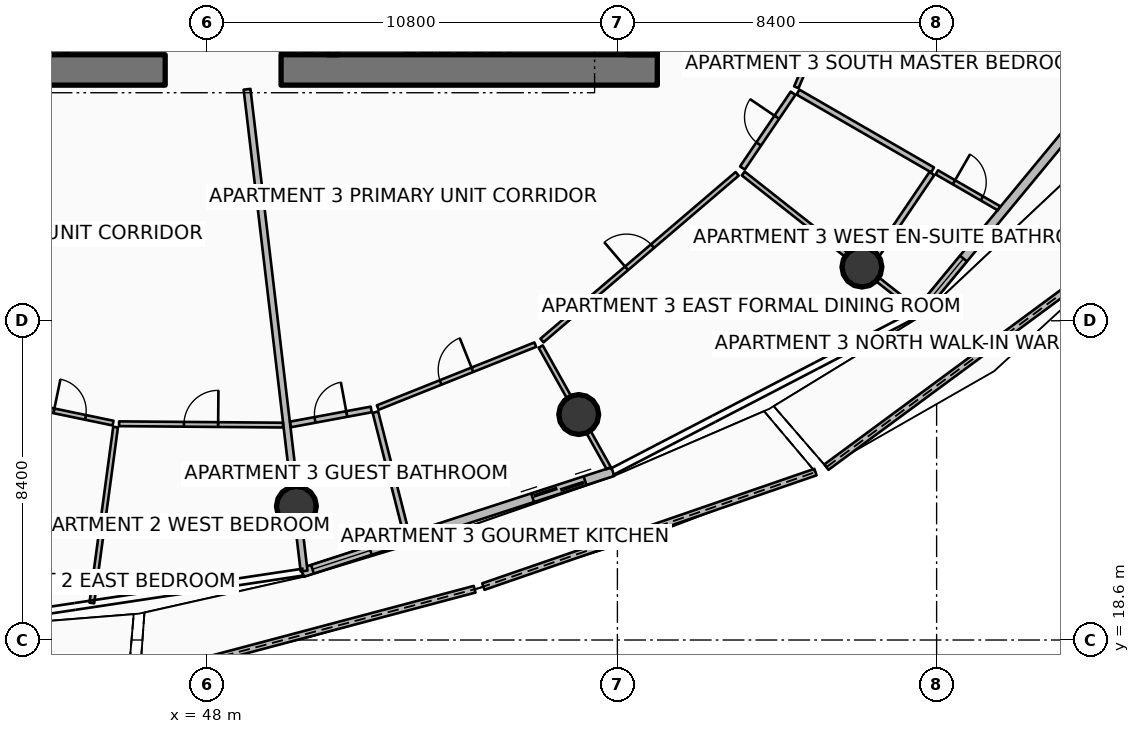
"""IFC4 building model, lengths in metres.
Left out: names, types, materials, properties, quantities, classifications, styles, units other than length and angle.
Written with IfcOpenShell. Run it as: python <this file> out.ifc"""

import sys

from ifc_helpers import new_model, si_unit, direction, frame, frame_2d, origin, origin_2d, place, context, subcontext, project, spatial, polyline, rectangle, circle, outline, extrude, element, fill, save


model = new_model("IFC4")
c1 = context("Model", 3, precision=1e-05, world=origin(), true_north=direction((0.0, 1.0)))
c2 = subcontext(c1, "Body", "Model", "MODEL_VIEW")
j1 = project(units=[si_unit("LENGTHUNIT", "METRE"), si_unit("PLANEANGLEUNIT", "RADIAN")], contexts=[c1])
p1 = place(None, origin())
s1 = spatial("IfcSite", under=j1, at=p1, CompositionType="ELEMENT")
p2 = place(p1, origin())
s2 = spatial("IfcBuilding", under=s1, at=p2, CompositionType="ELEMENT")
p3 = place(p2, frame((0.0, 0.0, 154.05)))
s3 = spatial("IfcBuildingStorey", under=s2, at=p3, CompositionType="ELEMENT", Elevation=154.05)
p4 = place(p3, frame((37.0, 33.6, 0.0), z_axis=(0.0, 0.0, 1.0), x_axis=(1.0, 0.0, 0.0)))
e1 = element("IfcWall", 1, at=p4, inside=s3, PredefinedType="SHEAR", context=c2, shape_type="SweptSolid", body=[
    extrude(rectangle(XDim=9.9, YDim=0.8, at=frame_2d((4.95, 0.0))), origin(), (0.0, 0.0, 1.0), 3.75),
])
p5 = place(p3, frame((49.95, 33.6, 0.0), z_axis=(0.0, 0.0, 1.0), x_axis=(1.0, 0.0, 0.0)))
e2 = element("IfcWall", 2, at=p5, inside=s3, PredefinedType="SHEAR", context=c2, shape_type="SweptSolid", body=[
    extrude(rectangle(XDim=9.9, YDim=0.8, at=frame_2d((4.95, 0.0))), origin(), (0.0, 0.0, 1.0), 3.75),
])
p6 = place(p3, frame((59.45, 34.0, 0.0), z_axis=(0.0, 0.0, 1.0), x_axis=(0.0, 1.0, 0.0)))
e3 = element("IfcWall", 3, at=p6, inside=s3, PredefinedType="SHEAR", context=c2, shape_type="SweptSolid", body=[
    extrude(rectangle(XDim=16.0, YDim=0.8, at=frame_2d((8.0, 0.0))), origin(), (0.0, 0.0, 1.0), 3.75),
])
p7 = place(p3, frame((51.31, 34.0, 0.0), z_axis=(0.0, 0.0, 1.0), x_axis=(0.0, 1.0, 0.0)))
e4 = element("IfcWall", 4, at=p7, inside=s3, PredefinedType="SHEAR", context=c2, shape_type="SweptSolid", body=[
    extrude(rectangle(XDim=3.5, YDim=0.28, at=frame_2d((1.75, 0.0))), origin(), (0.0, 0.0, 1.0), 3.75),
])
for number, where, z_axis, x_axis in (
    (5, (50.353, 22.119, 0.0), (0.0, 0.0, 1.0), (1.0, 0.0, 0.0)),
    (6, (57.782, 24.533, 0.0), (0.0, 0.0, 1.0), (1.0, 0.0, 0.0)),
    (7, (65.234, 28.414, 0.0), (0.0, 0.0, 1.0), (1.0, 0.0, 0.0)),
):
    element("IfcColumn", number, at=place(p3, frame(where, z_axis=z_axis, x_axis=x_axis)), inside=s3, PredefinedType="COLUMN", context=c2, shape_type="SweptSolid", body=[
        extrude(circle(Radius=0.525, at=origin_2d()), origin(), (0.0, 0.0, 1.0), 3.5),
    ])
p8 = place(p3, frame((46.229, 17.596, 0.0), z_axis=(0.0, 0.0, 1.0), x_axis=(0.966520511407, 0.256589362658, 0.0)))
e8 = element("IfcWall", 8, at=p8, inside=s3, PredefinedType="PARAPET", context=c2, shape_type="SweptSolid", body=[
    extrude(outline(polyline([(0.0, 0.0), (9.119, 0.0), (9.119, 1.148), (4.56, 1.127), (0.0, 1.224), (0.0, 0.0)])), frame((0.0, 0.09, 0.0), z_axis=(0.0, -1.0, 0.0), x_axis=(1.0, 0.0, 0.0)), (0.0, 0.0, 1.0), 0.18),
])
p9 = place(p3, frame((55.272, 20.006, 0.0), z_axis=(0.0, 0.0, 1.0), x_axis=(0.945395712623, 0.325924755971, 0.0)))
e9 = element("IfcWall", 9, at=p9, inside=s3, PredefinedType="PARAPET", context=c2, shape_type="SweptSolid", body=[
    extrude(outline(polyline([(0.0, 0.0), (9.244, 0.0), (9.244, 1.483), (4.622, 1.284), (0.0, 1.148), (0.0, 0.0)])), frame((0.0, 0.09, 0.0), z_axis=(0.0, -1.0, 0.0), x_axis=(1.0, 0.0, 0.0)), (0.0, 0.0, 1.0), 0.18),
])
p10 = place(p3, frame((64.3, 23.15, 0.0), z_axis=(0.0, 0.0, 1.0), x_axis=(0.804716582715, 0.593659179584, 0.0)))
e10 = element("IfcWall", 10, at=p10, inside=s3, PredefinedType="PARAPET", context=c2, shape_type="SweptSolid", body=[
    extrude(outline(polyline([(0.0, 0.0), (10.386, 0.0), (10.386, 1.832), (5.193, 1.696), (0.0, 1.497), (0.0, 0.0)])), frame((0.0, 0.09, 0.0), z_axis=(0.0, -1.0, 0.0), x_axis=(1.0, 0.0, 0.0)), (0.0, 0.0, 1.0), 0.18),
])
p11 = place(p3, frame((50.51, 20.376, 0.0), z_axis=(0.0, 0.0, 1.0), x_axis=(0.951046390632, 0.309048156224, 0.0)))
e11 = element("IfcWall", 11, at=p11, inside=s3, PredefinedType="SOLIDWALL", context=c2, shape_type="SweptSolid", body=[
    extrude(rectangle(XDim=8.59, YDim=0.24, at=frame_2d((4.295, 0.0))), origin(), (0.0, 0.0, 1.0), 2.45),
])
p12 = place(p11, frame((6.37, 0.0, 0.0)))
e12 = element("IfcOpeningElement", 12, at=p12, cuts=e11, PredefinedType="OPENING", context=c2, shape_type="SweptSolid", body=[
    extrude(rectangle(XDim=1.45, YDim=2.15, at=frame_2d((0.725, 1.075))), frame((0.0, 0.13, 0.0), z_axis=(0.0, -1.0, 0.0), x_axis=(1.0, 0.0, 0.0)), (0.0, 0.0, 1.0), 0.26),
])
p13 = place(p11, frame((0.28, 0.0, 0.65)))
e13 = element("IfcOpeningElement", 13, at=p13, cuts=e11, PredefinedType="OPENING", context=c2, shape_type="SweptSolid", body=[
    extrude(rectangle(XDim=1.6, YDim=1.5, at=frame_2d((0.8, 0.75))), frame((0.0, 0.13, 0.0), z_axis=(0.0, -1.0, 0.0), x_axis=(1.0, 0.0, 0.0)), (0.0, 0.0, 1.0), 0.26),
])
p14 = place(p3, frame((66.709, 27.187, 0.0), z_axis=(0.0, 0.0, 1.0), x_axis=(0.636771922292, 0.77105221547, 0.0)))
e14 = element("IfcWall", 14, at=p14, inside=s3, PredefinedType="SOLIDWALL", context=c2, shape_type="SweptSolid", body=[
    extrude(rectangle(XDim=10.082, YDim=0.24, at=frame_2d((5.041, 0.0))), origin(), (0.0, 0.0, 1.0), 2.45),
])
p15 = place(p14, frame((7.862, 0.0, 0.0)))
e15 = element("IfcOpeningElement", 15, at=p15, cuts=e14, PredefinedType="OPENING", context=c2, shape_type="SweptSolid", body=[
    extrude(rectangle(XDim=1.45, YDim=2.15, at=frame_2d((0.725, 1.075))), frame((0.0, 0.13, 0.0), z_axis=(0.0, -1.0, 0.0), x_axis=(1.0, 0.0, 0.0)), (0.0, 0.0, 1.0), 0.26),
])
p16 = place(p14, frame((0.28, 0.0, 0.65)))
e16 = element("IfcOpeningElement", 16, at=p16, cuts=e14, PredefinedType="OPENING", context=c2, shape_type="SweptSolid", body=[
    extrude(rectangle(XDim=1.6, YDim=1.5, at=frame_2d((0.8, 0.75))), frame((0.0, 0.13, 0.0), z_axis=(0.0, -1.0, 0.0), x_axis=(1.0, 0.0, 0.0)), (0.0, 0.0, 1.0), 0.26),
])
p17 = place(p3, frame((44.28, 34.05, 0.0), z_axis=(0.0, 0.0, 1.0), x_axis=(0.0, 1.0, 0.0)))
e17 = element("IfcWall", 17, at=p17, inside=s3, PredefinedType="PARTITIONING", context=c2, shape_type="SweptSolid", body=[
    extrude(rectangle(XDim=2.03, YDim=0.125, at=frame_2d((1.015, 0.0))), origin(), (0.0, 0.0, 1.0), 2.94),
])
p18 = place(p3, frame((49.98, 34.06, 0.0), z_axis=(0.0, 0.0, 1.0), x_axis=(0.0, 1.0, 0.0)))
e18 = element("IfcWall", 18, at=p18, inside=s3, PredefinedType="PARTITIONING", context=c2, shape_type="SweptSolid", body=[
    extrude(rectangle(XDim=3.4, YDim=0.125, at=frame_2d((1.7, 0.0))), origin(), (0.0, 0.0, 1.0), 2.94),
])
p19 = place(p3, frame((49.054, 33.091, 0.0), z_axis=(0.0, 0.0, 1.0), x_axis=(0.117543744731, -0.993067705685, 0.0)))
e19 = element("IfcWall", 19, at=p19, inside=s3, PredefinedType="PARTITIONING", context=c2, shape_type="SweptSolid", body=[
    extrude(rectangle(XDim=12.763, YDim=0.18, at=frame_2d((6.382, 0.0))), origin(), (0.0, 0.0, 1.0), 2.94),
])
p20 = place(p3, frame((45.595, 24.202, 0.0), z_axis=(0.0, 0.0, 1.0), x_axis=(-0.133913732336, -0.990992993059, 0.0)))
e20 = element("IfcWall", 20, at=p20, inside=s3, PredefinedType="PARTITIONING", context=c2, shape_type="SweptSolid", body=[
    extrude(rectangle(XDim=4.669, YDim=0.125, at=frame_2d((2.334, 0.0))), origin(), (0.0, 0.0, 1.0), 2.94),
])
p21 = place(p3, frame((43.247, 24.781, 0.0), z_axis=(0.0, 0.0, 1.0), x_axis=(0.979144850172, -0.203163388388, 0.0)))
e21 = element("IfcWall", 21, at=p21, inside=s3, PredefinedType="PARTITIONING", context=c2, shape_type="SweptSolid", body=[
    extrude(rectangle(XDim=2.33, YDim=0.125, at=frame_2d((1.165, 0.0))), origin(), (0.0, 0.0, 1.0), 2.94),
])
p22 = place(p21, frame((0.74, 0.0, 0.0)))
e22 = element("IfcOpeningElement", 22, at=p22, cuts=e21, PredefinedType="OPENING", context=c2, shape_type="SweptSolid", body=[
    extrude(rectangle(XDim=0.85, YDim=2.06, at=frame_2d((0.425, 1.03))), frame((0.0, 0.073, 0.0), z_axis=(0.0, -1.0, 0.0), x_axis=(1.0, 0.0, 0.0)), (0.0, 0.0, 1.0), 0.145),
])
p23 = place(p3, frame((45.687, 24.29, 0.0), z_axis=(0.0, 0.0, 1.0), x_axis=(0.999965854942, -0.008263712844, 0.0)))
e23 = element("IfcWall", 23, at=p23, inside=s3, PredefinedType="PARTITIONING", context=c2, shape_type="SweptSolid", body=[
    extrude(rectangle(XDim=4.313, YDim=0.125, at=frame_2d((2.157, 0.0))), origin(), (0.0, 0.0, 1.0), 2.94),
])
p24 = place(p23, frame((1.707, 0.0, 0.0)))
e24 = element("IfcOpeningElement", 24, at=p24, cuts=e23, PredefinedType="OPENING", context=c2, shape_type="SweptSolid", body=[
    extrude(rectangle(XDim=0.9, YDim=2.08, at=frame_2d((0.45, 1.04))), frame((0.0, 0.073, 0.0), z_axis=(0.0, -1.0, 0.0), x_axis=(1.0, 0.0, 0.0)), (0.0, 0.0, 1.0), 0.145),
])
p25 = place(p3, frame((50.199, 24.272, 0.0), z_axis=(0.0, 0.0, 1.0), x_axis=(0.98320468223, 0.182506309042, 0.0)))
e25 = element("IfcWall", 25, at=p25, inside=s3, PredefinedType="PARTITIONING", context=c2, shape_type="SweptSolid", body=[
    extrude(rectangle(XDim=2.159, YDim=0.15, at=frame_2d((1.08, 0.0))), origin(), (0.0, 0.0, 1.0), 2.94),
])
p26 = place(p25, frame((0.655, 0.0, 0.0)))
e26 = element("IfcOpeningElement", 26, at=p26, cuts=e25, PredefinedType="OPENING", context=c2, shape_type="SweptSolid", body=[
    extrude(rectangle(XDim=0.85, YDim=2.06, at=frame_2d((0.425, 1.03))), frame((0.0, 0.085, 0.0), z_axis=(0.0, -1.0, 0.0), x_axis=(1.0, 0.0, 0.0)), (0.0, 0.0, 1.0), 0.17),
])
p27 = place(p3, frame((52.432, 24.595, 0.0), z_axis=(0.0, 0.0, 1.0), x_axis=(0.246779038105, -0.969071775645, 0.0)))
e27 = element("IfcWall", 27, at=p27, inside=s3, PredefinedType="PARTITIONING", context=c2, shape_type="SweptSolid", body=[
    extrude(rectangle(XDim=3.301, YDim=0.15, at=frame_2d((1.651, 0.0))), origin(), (0.0, 0.0, 1.0), 2.94),
])
p28 = place(p3, frame((52.494, 24.716, 0.0), z_axis=(0.0, 0.0, 1.0), x_axis=(0.928695316587, 0.370843644882, 0.0)))
e28 = element("IfcWall", 28, at=p28, inside=s3, PredefinedType="PARTITIONING", context=c2, shape_type="SweptSolid", body=[
    extrude(rectangle(XDim=4.464, YDim=0.125, at=frame_2d((2.232, 0.0))), origin(), (0.0, 0.0, 1.0), 2.94),
])
p29 = place(p28, frame((1.782, 0.0, 0.0)))
e29 = element("IfcOpeningElement", 29, at=p29, cuts=e28, PredefinedType="OPENING", context=c2, shape_type="SweptSolid", body=[
    extrude(rectangle(XDim=0.9, YDim=2.08, at=frame_2d((0.45, 1.04))), frame((0.0, 0.073, 0.0), z_axis=(0.0, -1.0, 0.0), x_axis=(1.0, 0.0, 0.0)), (0.0, 0.0, 1.0), 0.145),
])
p30 = place(p3, frame((56.781, 26.321, 0.0), z_axis=(0.0, 0.0, 1.0), x_axis=(0.488615541235, -0.872499199348, 0.0)))
e30 = element("IfcWall", 30, at=p30, inside=s3, PredefinedType="PARTITIONING", context=c2, shape_type="SweptSolid", body=[
    extrude(rectangle(XDim=3.665, YDim=0.125, at=frame_2d((1.832, 0.0))), origin(), (0.0, 0.0, 1.0), 2.94),
])
p31 = place(p3, frame((56.815, 26.48, 0.0), z_axis=(0.0, 0.0, 1.0), x_axis=(0.760406411553, 0.649447526186, 0.0)))
e31 = element("IfcWall", 31, at=p31, inside=s3, PredefinedType="PARTITIONING", context=c2, shape_type="SweptSolid", body=[
    extrude(rectangle(XDim=6.753, YDim=0.125, at=frame_2d((3.376, 0.0))), origin(), (0.0, 0.0, 1.0), 2.94),
])
p32 = place(p31, frame((2.926, 0.0, 0.0)))
e32 = element("IfcOpeningElement", 32, at=p32, cuts=e31, PredefinedType="OPENING", context=c2, shape_type="SweptSolid", body=[
    extrude(rectangle(XDim=0.9, YDim=2.08, at=frame_2d((0.45, 1.04))), frame((0.0, 0.073, 0.0), z_axis=(0.0, -1.0, 0.0), x_axis=(1.0, 0.0, 0.0)), (0.0, 0.0, 1.0), 0.145),
])
p33 = place(p3, frame((62.112, 30.875, 0.0), z_axis=(0.0, 0.0, 1.0), x_axis=(0.785328664081, -0.619079065526, 0.0)))
e33 = element("IfcWall", 33, at=p33, inside=s3, PredefinedType="PARTITIONING", context=c2, shape_type="SweptSolid", body=[
    extrude(rectangle(XDim=5.87, YDim=0.125, at=frame_2d((2.935, 0.0))), origin(), (0.0, 0.0, 1.0), 2.94),
])
p34 = place(p3, frame((62.09, 31.02, 0.0), z_axis=(0.0, 0.0, 1.0), x_axis=(0.561179778306, 0.827693938857, 0.0)))
e34 = element("IfcWall", 34, at=p34, inside=s3, PredefinedType="PARTITIONING", context=c2, shape_type="SweptSolid", body=[
    extrude(rectangle(XDim=2.376, YDim=0.15, at=frame_2d((1.188, 0.0))), origin(), (0.0, 0.0, 1.0), 2.94),
])
p35 = place(p34, frame((0.763, 0.0, 0.0)))
e35 = element("IfcOpeningElement", 35, at=p35, cuts=e34, PredefinedType="OPENING", context=c2, shape_type="SweptSolid", body=[
    extrude(rectangle(XDim=0.85, YDim=2.06, at=frame_2d((0.425, 1.03))), frame((0.0, 0.085, 0.0), z_axis=(0.0, -1.0, 0.0), x_axis=(1.0, 0.0, 0.0)), (0.0, 0.0, 1.0), 0.17),
])
p36 = place(p3, frame((65.404, 28.407, 0.0), z_axis=(0.0, 0.0, 1.0), x_axis=(0.561106969612, 0.827743298767, 0.0)))
e36 = element("IfcWall", 36, at=p36, inside=s3, PredefinedType="PARTITIONING", context=c2, shape_type="SweptSolid", body=[
    extrude(rectangle(XDim=2.982, YDim=0.15, at=frame_2d((1.491, 0.0))), origin(), (0.0, 0.0, 1.0), 2.94),
])
p37 = place(p3, frame((63.552, 33.016, 0.0), z_axis=(0.0, 0.0, 1.0), x_axis=(0.865897249189, -0.500221904605, 0.0)))
e37 = element("IfcWall", 37, at=p37, inside=s3, PredefinedType="PARTITIONING", context=c2, shape_type="SweptSolid", body=[
    extrude(rectangle(XDim=4.09, YDim=0.15, at=frame_2d((2.045, 0.0))), origin(), (0.0, 0.0, 1.0), 2.94),
])
p38 = place(p3, frame((67.206, 30.905, 0.0), z_axis=(0.0, 0.0, 1.0), x_axis=(0.865877522555, -0.500256050372, 0.0)))
e38 = element("IfcWall", 38, at=p38, inside=s3, PredefinedType="PARTITIONING", context=c2, shape_type="SweptSolid", body=[
    extrude(rectangle(XDim=1.888, YDim=0.125, at=frame_2d((0.944, 0.0))), origin(), (0.0, 0.0, 1.0), 2.94),
])
p39 = place(p38, frame((0.519, 0.0, 0.0)))
e39 = element("IfcOpeningElement", 39, at=p39, cuts=e38, PredefinedType="OPENING", context=c2, shape_type="SweptSolid", body=[
    extrude(rectangle(XDim=0.85, YDim=2.06, at=frame_2d((0.425, 1.03))), frame((0.0, 0.073, 0.0), z_axis=(0.0, -1.0, 0.0), x_axis=(1.0, 0.0, 0.0)), (0.0, 0.0, 1.0), 0.145),
])
p40 = place(p3, frame((63.509, 33.144, 0.0), z_axis=(0.0, 0.0, 1.0), x_axis=(0.38881485578, 0.921315911034, 0.0)))
e40 = element("IfcWall", 40, at=p40, inside=s3, PredefinedType="PARTITIONING", context=c2, shape_type="SweptSolid", body=[
    extrude(rectangle(XDim=4.248, YDim=0.125, at=frame_2d((2.124, 0.0))), origin(), (0.0, 0.0, 1.0), 2.94),
])
p41 = place(p40, frame((1.674, 0.0, 0.0)))
e41 = element("IfcOpeningElement", 41, at=p41, cuts=e40, PredefinedType="OPENING", context=c2, shape_type="SweptSolid", body=[
    extrude(rectangle(XDim=0.9, YDim=2.08, at=frame_2d((0.45, 1.04))), frame((0.0, 0.073, 0.0), z_axis=(0.0, -1.0, 0.0), x_axis=(1.0, 0.0, 0.0)), (0.0, 0.0, 1.0), 0.145),
])
p42 = place(p12, origin())
e42 = element("IfcDoor", 42, at=p42, inside=s3, OperationType="DOUBLE_DOOR_SLIDING", PredefinedType="DOOR", context=c2, shape_type="SweptSolid", body=[
    extrude(rectangle(XDim=1.45, YDim=2.15, at=frame_2d((0.725, 1.075))), frame((0.0, 0.025, 0.0), z_axis=(0.0, -1.0, 0.0), x_axis=(1.0, 0.0, 0.0)), (0.0, 0.0, 1.0), 0.05),
])
fill(e12, e42)
p43 = place(p13, origin())
e43 = element("IfcWindow", 43, at=p43, inside=s3, PartitioningType="SINGLE_PANEL", PredefinedType="WINDOW", context=c2, shape_type="SweptSolid", body=[
    extrude(rectangle(XDim=1.6, YDim=1.5, at=frame_2d((0.8, 0.75))), frame((0.0, 0.03, 0.0), z_axis=(0.0, -1.0, 0.0), x_axis=(1.0, 0.0, 0.0)), (0.0, 0.0, 1.0), 0.06),
])
fill(e13, e43)
p44 = place(p16, origin())
e44 = element("IfcWindow", 44, at=p44, inside=s3, PartitioningType="SINGLE_PANEL", PredefinedType="WINDOW", context=c2, shape_type="SweptSolid", body=[
    extrude(rectangle(XDim=1.6, YDim=1.5, at=frame_2d((0.8, 0.75))), frame((0.0, 0.03, 0.0), z_axis=(0.0, -1.0, 0.0), x_axis=(1.0, 0.0, 0.0)), (0.0, 0.0, 1.0), 0.06),
])
fill(e16, e44)
p45 = place(p22, origin())
e45 = element("IfcDoor", 45, at=p45, inside=s3, OperationType="SINGLE_SWING_LEFT", PredefinedType="DOOR", context=c2, shape_type="SweptSolid", body=[
    extrude(rectangle(XDim=0.85, YDim=2.06, at=frame_2d((0.425, 1.03))), frame((0.0, 0.025, 0.0), z_axis=(0.0, -1.0, 0.0), x_axis=(1.0, 0.0, 0.0)), (0.0, 0.0, 1.0), 0.05),
])
fill(e22, e45)
p46 = place(p24, origin())
e46 = element("IfcDoor", 46, at=p46, inside=s3, OperationType="SINGLE_SWING_RIGHT", PredefinedType="DOOR", context=c2, shape_type="SweptSolid", body=[
    extrude(rectangle(XDim=0.9, YDim=2.08, at=frame_2d((0.45, 1.04))), frame((0.0, 0.025, 0.0), z_axis=(0.0, -1.0, 0.0), x_axis=(1.0, 0.0, 0.0)), (0.0, 0.0, 1.0), 0.05),
])
fill(e24, e46)
p47 = place(p26, origin())
e47 = element("IfcDoor", 47, at=p47, inside=s3, OperationType="SINGLE_SWING_RIGHT", PredefinedType="DOOR", context=c2, shape_type="SweptSolid", body=[
    extrude(rectangle(XDim=0.85, YDim=2.06, at=frame_2d((0.425, 1.03))), frame((0.0, 0.025, 0.0), z_axis=(0.0, -1.0, 0.0), x_axis=(1.0, 0.0, 0.0)), (0.0, 0.0, 1.0), 0.05),
])
fill(e26, e47)
p48 = place(p29, origin())
e48 = element("IfcDoor", 48, at=p48, inside=s3, OperationType="SINGLE_SWING_RIGHT", PredefinedType="DOOR", context=c2, shape_type="SweptSolid", body=[
    extrude(rectangle(XDim=0.9, YDim=2.08, at=frame_2d((0.45, 1.04))), frame((0.0, 0.025, 0.0), z_axis=(0.0, -1.0, 0.0), x_axis=(1.0, 0.0, 0.0)), (0.0, 0.0, 1.0), 0.05),
])
fill(e29, e48)
p49 = place(p32, origin())
e49 = element("IfcDoor", 49, at=p49, inside=s3, OperationType="SINGLE_SWING_LEFT", PredefinedType="DOOR", context=c2, shape_type="SweptSolid", body=[
    extrude(rectangle(XDim=0.9, YDim=2.08, at=frame_2d((0.45, 1.04))), frame((0.0, 0.025, 0.0), z_axis=(0.0, -1.0, 0.0), x_axis=(1.0, 0.0, 0.0)), (0.0, 0.0, 1.0), 0.05),
])
fill(e32, e49)
p50 = place(p35, origin())
e50 = element("IfcDoor", 50, at=p50, inside=s3, OperationType="SINGLE_SWING_RIGHT", PredefinedType="DOOR", context=c2, shape_type="SweptSolid", body=[
    extrude(rectangle(XDim=0.85, YDim=2.06, at=frame_2d((0.425, 1.03))), frame((0.0, 0.025, 0.0), z_axis=(0.0, -1.0, 0.0), x_axis=(1.0, 0.0, 0.0)), (0.0, 0.0, 1.0), 0.05),
])
fill(e35, e50)
p51 = place(p39, origin())
e51 = element("IfcDoor", 51, at=p51, inside=s3, OperationType="SINGLE_SWING_LEFT", PredefinedType="DOOR", context=c2, shape_type="SweptSolid", body=[
    extrude(rectangle(XDim=0.85, YDim=2.06, at=frame_2d((0.425, 1.03))), frame((0.0, 0.025, 0.0), z_axis=(0.0, -1.0, 0.0), x_axis=(1.0, 0.0, 0.0)), (0.0, 0.0, 1.0), 0.05),
])
fill(e39, e51)
save(model, sys.argv[1])
